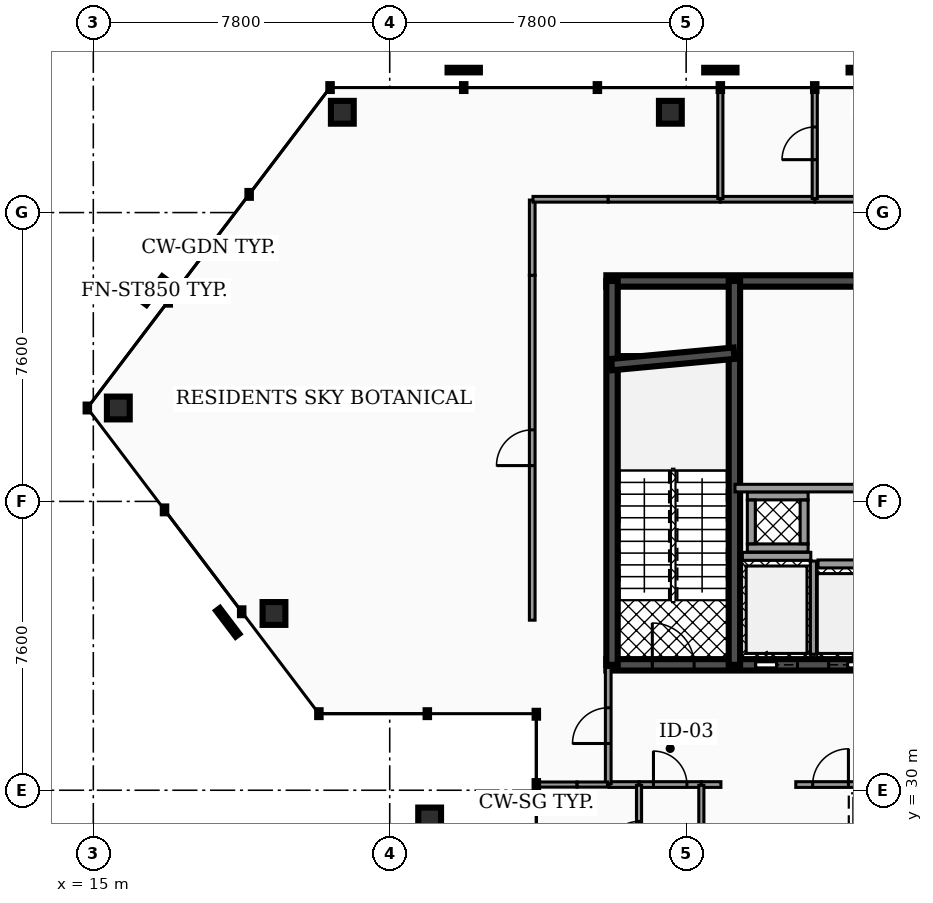
"""IFC4 building model, lengths in metres.
Left out: names, types, materials, properties, quantities, classifications, styles, units other than length and angle.
Written with IfcOpenShell. Run it as: python <this file> out.ifc"""

import sys

from ifc_helpers import new_model, si_unit, direction, frame, frame_2d, origin, origin_2d, place, context, subcontext, project, spatial, rectangle, hollow_rectangle, extrude, element, fill, save


model = new_model("IFC4")
c1 = context("Model", 3, precision=1e-05, world=origin(), true_north=direction((0.0, 1.0)))
c2 = subcontext(c1, "Body", "Model", "MODEL_VIEW")
j1 = project(units=[si_unit("LENGTHUNIT", "METRE"), si_unit("PLANEANGLEUNIT", "RADIAN")], contexts=[c1])
p1 = place(None, origin())
s1 = spatial("IfcSite", under=j1, at=p1, CompositionType="ELEMENT")
p2 = place(p1, origin())
s2 = spatial("IfcBuilding", under=s1, at=p2, CompositionType="ELEMENT")
p3 = place(p2, frame((0.0, 0.0, 204.34)))
s3 = spatial("IfcBuildingStorey", under=s2, at=p3, CompositionType="ELEMENT", Elevation=204.34)
p4 = place(p3, frame((28.5, 43.4, 0.0), z_axis=(0.0, 0.0, 1.0), x_axis=(1.0, 0.0, 0.0)))
e1 = element("IfcWall", 1, at=p4, inside=s3, PredefinedType="SHEAR", context=c2, shape_type="SweptSolid", body=[
    extrude(rectangle(XDim=19.86, YDim=0.3, at=frame_2d((9.93, 0.0))), origin(), (0.0, 0.0, 1.0), 4.2),
])
p5 = place(p3, frame((28.5, 33.3, 0.0), z_axis=(0.0, 0.0, 1.0), x_axis=(1.0, 0.0, 0.0)))
e2 = element("IfcWall", 2, at=p5, inside=s3, PredefinedType="SHEAR", context=c2, shape_type="SweptSolid", body=[
    extrude(rectangle(XDim=19.86, YDim=0.3, at=frame_2d((9.93, 0.0))), origin(), (0.0, 0.0, 1.0), 4.2),
])
p6 = place(p5, frame((3.93, 0.0, 0.0)))
e3 = element("IfcOpeningElement", 3, at=p6, cuts=e2, PredefinedType="OPENING", context=c2, shape_type="SweptSolid", body=[
    extrude(rectangle(XDim=1.1, YDim=2.15, at=frame_2d((0.55, 1.075))), frame((0.0, 0.16, 0.0), z_axis=(0.0, -1.0, 0.0), x_axis=(1.0, 0.0, 0.0)), (0.0, 0.0, 1.0), 0.32),
])
p7 = place(p5, frame((14.77, 0.0, 0.0)))
e4 = element("IfcOpeningElement", 4, at=p7, cuts=e2, PredefinedType="OPENING", context=c2, shape_type="SweptSolid", body=[
    extrude(rectangle(XDim=1.1, YDim=2.15, at=frame_2d((0.55, 1.075))), frame((0.0, 0.16, 0.0), z_axis=(0.0, -1.0, 0.0), x_axis=(1.0, 0.0, 0.0)), (0.0, 0.0, 1.0), 0.32),
])
p8 = place(p5, frame((11.25, 0.0, 0.0)))
e5 = element("IfcOpeningElement", 5, at=p8, cuts=e2, PredefinedType="OPENING", context=c2, shape_type="SweptSolid", body=[
    extrude(rectangle(XDim=1.0, YDim=2.1, at=frame_2d((0.5, 1.05))), frame((0.0, 0.16, 0.0), z_axis=(0.0, -1.0, 0.0), x_axis=(1.0, 0.0, 0.0)), (0.0, 0.0, 1.0), 0.32),
])
p9 = place(p5, frame((12.95, 0.0, 0.0)))
e6 = element("IfcOpeningElement", 6, at=p9, cuts=e2, PredefinedType="OPENING", context=c2, shape_type="SweptSolid", body=[
    extrude(rectangle(XDim=1.0, YDim=2.1, at=frame_2d((0.5, 1.05))), frame((0.0, 0.16, 0.0), z_axis=(0.0, -1.0, 0.0), x_axis=(1.0, 0.0, 0.0)), (0.0, 0.0, 1.0), 0.32),
])
p10 = place(p5, frame((5.85, 0.0, 0.0)))
e7 = element("IfcOpeningElement", 7, at=p10, cuts=e2, PredefinedType="OPENING", context=c2, shape_type="SweptSolid", body=[
    extrude(rectangle(XDim=1.0, YDim=2.1, at=frame_2d((0.5, 1.05))), frame((0.0, 0.16, 0.0), z_axis=(0.0, -1.0, 0.0), x_axis=(1.0, 0.0, 0.0)), (0.0, 0.0, 1.0), 0.32),
])
p11 = place(p5, frame((1.21, 0.0, 0.0)))
e8 = element("IfcOpeningElement", 8, at=p11, cuts=e2, PredefinedType="OPENING", context=c2, shape_type="SweptSolid", body=[
    extrude(rectangle(XDim=1.1, YDim=2.2, at=frame_2d((0.55, 1.1))), frame((0.0, 0.16, 0.0), z_axis=(0.0, -1.0, 0.0), x_axis=(1.0, 0.0, 0.0)), (0.0, 0.0, 1.0), 0.32),
])
p12 = place(p5, frame((9.34, 0.0, 0.0)))
e9 = element("IfcOpeningElement", 9, at=p12, cuts=e2, PredefinedType="OPENING", context=c2, shape_type="SweptSolid", body=[
    extrude(rectangle(XDim=1.12, YDim=2.05, at=frame_2d((0.56, 1.025))), frame((0.0, 0.16, 0.0), z_axis=(0.0, -1.0, 0.0), x_axis=(1.0, 0.0, 0.0)), (0.0, 0.0, 1.0), 0.32),
])
p13 = place(p5, frame((17.55, 0.0, 0.0)))
e10 = element("IfcOpeningElement", 10, at=p13, cuts=e2, PredefinedType="OPENING", context=c2, shape_type="SweptSolid", body=[
    extrude(rectangle(XDim=1.1, YDim=2.2, at=frame_2d((0.55, 1.1))), frame((0.0, 0.16, 0.0), z_axis=(0.0, -1.0, 0.0), x_axis=(1.0, 0.0, 0.0)), (0.0, 0.0, 1.0), 0.32),
])
for number, where, z_axis, x_axis in (
    (11, (28.65, 33.3, 0.0), (0.0, 0.0, 1.0), (0.0, 1.0, 0.0)),
    (12, (31.87, 33.3, 0.0), (0.0, 0.0, 1.0), (0.0, 1.0, 0.0)),
):
    element("IfcWall", number, at=place(p3, frame(where, z_axis=z_axis, x_axis=x_axis)), inside=s3, PredefinedType="SHEAR", context=c2, shape_type="SweptSolid", body=[
        extrude(rectangle(XDim=10.1, YDim=0.3, at=frame_2d((5.05, 0.0))), origin(), (0.0, 0.0, 1.0), 4.2),
    ])
p14 = place(p3, frame((28.64, 41.2, 0.0), z_axis=(0.0, 0.0, 1.0), x_axis=(0.995687118776, 0.092774789157, 0.0)))
e13 = element("IfcWall", 13, at=p14, inside=s3, PredefinedType="SHEAR", context=c2, shape_type="SweptSolid", body=[
    extrude(rectangle(XDim=3.234, YDim=0.3, at=frame_2d((1.617, 0.0))), origin(), (0.0, 0.0, 1.0), 4.2),
])
p15 = place(p3, frame((30.185, 47.839, 0.0), z_axis=(-0.021615343823, -0.018593844149, 0.99959344029), x_axis=(0.652132982659, -0.758104592341, 0.0)))
e14 = element("IfcColumn", 14, at=p15, inside=s3, PredefinedType="COLUMN", context=c2, shape_type="SweptSolid", body=[
    extrude(hollow_rectangle(XDim=0.6, YDim=0.6, WallThickness=0.03, at=origin_2d()), origin(), (0.0, 0.0, 1.0), 4.202),
])
p16 = place(p3, frame((21.553, 47.839, 0.0), z_axis=(-0.039780236336, -0.01858346807, 0.99903562875), x_axis=(0.423247470362, -0.906014116243, 0.0)))
e15 = element("IfcColumn", 15, at=p16, inside=s3, PredefinedType="COLUMN", context=c2, shape_type="SweptSolid", body=[
    extrude(hollow_rectangle(XDim=0.6, YDim=0.6, WallThickness=0.03, at=origin_2d()), origin(), (0.0, 0.0, 1.0), 4.204),
])
p17 = place(p3, frame((15.658, 40.058, 0.0), z_axis=(0.026319341166, 0.068638986653, 0.997294330572), x_axis=(-0.933710970217, 0.358027686215, 0.0)))
e16 = element("IfcColumn", 16, at=p17, inside=s3, PredefinedType="COLUMN", context=c2, shape_type="SweptSolid", body=[
    extrude(hollow_rectangle(XDim=0.6, YDim=0.6, WallThickness=0.03, at=origin_2d()), origin(), (0.0, 0.0, 1.0), 4.211),
])
p18 = place(p3, frame((19.754, 34.651, 0.0), z_axis=(0.033520923169, 0.059212564975, 0.997682424351), x_axis=(-0.870229277639, 0.492646936802, 0.0)))
e17 = element("IfcColumn", 17, at=p18, inside=s3, PredefinedType="COLUMN", context=c2, shape_type="SweptSolid", body=[
    extrude(hollow_rectangle(XDim=0.6, YDim=0.6, WallThickness=0.03, at=origin_2d()), origin(), (0.0, 0.0, 1.0), 4.21),
])
p19 = place(p3, frame((23.85, 29.244, 0.0), z_axis=(0.040664573665, 0.049714036564, 0.997935322061), x_axis=(-0.77403777564, 0.633139417414, 0.0)))
e18 = element("IfcColumn", 18, at=p19, inside=s3, PredefinedType="COLUMN", context=c2, shape_type="SweptSolid", body=[
    extrude(hollow_rectangle(XDim=0.6, YDim=0.6, WallThickness=0.03, at=origin_2d()), origin(), (0.0, 0.0, 1.0), 4.209),
])
p20 = place(p3, frame((32.08, 36.155, 0.0), z_axis=(0.0, 0.0, 1.0), x_axis=(1.0, 0.0, 0.0)))
e19 = element("IfcWall", 19, at=p20, inside=s3, PredefinedType="SOLIDWALL", context=c2, shape_type="SweptSolid", body=[
    extrude(rectangle(XDim=1.8, YDim=0.21, at=frame_2d((0.9, 0.0))), origin(), (0.0, 0.0, 1.0), 3.172),
])
p21 = place(p3, frame((33.95, 33.58, 0.0), z_axis=(0.0, 0.0, 1.0), x_axis=(0.0, 1.0, 0.0)))
e20 = element("IfcWall", 20, at=p21, inside=s3, PredefinedType="SOLIDWALL", context=c2, shape_type="SweptSolid", body=[
    extrude(rectangle(XDim=2.45, YDim=0.16, at=frame_2d((1.225, 0.0))), origin(), (0.0, 0.0, 1.0), 3.172),
])
p22 = place(p3, frame((34.07, 35.955, 0.0), z_axis=(0.0, 0.0, 1.0), x_axis=(1.0, 0.0, 0.0)))
e21 = element("IfcWall", 21, at=p22, inside=s3, PredefinedType="SOLIDWALL", context=c2, shape_type="SweptSolid", body=[
    extrude(rectangle(XDim=1.56, YDim=0.21, at=frame_2d((0.78, 0.0))), origin(), (0.0, 0.0, 1.0), 3.172),
])
for number, where, z_axis, x_axis in (
    (22, (32.21, 36.375, 0.0), (0.0, 0.0, 1.0), (1.0, 0.0, 0.0)),
    (23, (32.21, 37.745, 0.0), (0.0, 0.0, 1.0), (1.0, 0.0, 0.0)),
):
    element("IfcWall", number, at=place(p3, frame(where, z_axis=z_axis, x_axis=x_axis)), inside=s3, PredefinedType="SOLIDWALL", context=c2, shape_type="SweptSolid", body=[
        extrude(rectangle(XDim=1.6, YDim=0.21, at=frame_2d((0.8, 0.0))), origin(), (0.0, 0.0, 1.0), 4.2),
    ])
for number, where, z_axis, x_axis in (
    (24, (32.315, 36.485, 0.0), (0.0, 0.0, 1.0), (0.0, 1.0, 0.0)),
    (25, (33.705, 36.485, 0.0), (0.0, 0.0, 1.0), (0.0, 1.0, 0.0)),
):
    element("IfcWall", number, at=place(p3, frame(where, z_axis=z_axis, x_axis=x_axis)), inside=s3, PredefinedType="SOLIDWALL", context=c2, shape_type="SweptSolid", body=[
        extrude(rectangle(XDim=1.15, YDim=0.21, at=frame_2d((0.575, 0.0))), origin(), (0.0, 0.0, 1.0), 4.2),
    ])
p23 = place(p3, frame((31.885, 37.95, 0.0), z_axis=(0.0, 0.0, 1.0), x_axis=(1.0, 0.0, 0.0)))
e26 = element("IfcWall", 26, at=p23, inside=s3, PredefinedType="PARTITIONING", context=c2, shape_type="SweptSolid", body=[
    extrude(rectangle(XDim=3.895, YDim=0.2, at=frame_2d((1.948, 0.0))), origin(), (0.0, 0.0, 1.0), 3.157),
])
p24 = place(p3, frame((29.365, 30.15, 0.0), z_axis=(0.0, 0.0, 1.0), x_axis=(1.0, 0.0, 0.0)))
e27 = element("IfcWall", 27, at=p24, inside=s3, PredefinedType="PARTITIONING", context=c2, shape_type="SweptSolid", body=[
    extrude(rectangle(XDim=1.63, YDim=0.15, at=frame_2d((0.815, 0.0))), origin(), (0.0, 0.0, 1.0), 3.157),
])
p25 = place(p24, frame((0.375, 0.0, 0.0)))
e28 = element("IfcOpeningElement", 28, at=p25, cuts=e27, PredefinedType="OPENING", context=c2, shape_type="SweptSolid", body=[
    extrude(rectangle(XDim=0.88, YDim=2.05, at=frame_2d((0.44, 1.025))), frame((0.0, 0.085, 0.0), z_axis=(0.0, -1.0, 0.0), x_axis=(1.0, 0.0, 0.0)), (0.0, 0.0, 1.0), 0.17),
])
p26 = place(p3, frame((28.57, 30.15, 0.0), z_axis=(0.0, 0.0, 1.0), x_axis=(1.0, 0.0, 0.0)))
e29 = element("IfcWall", 29, at=p26, inside=s3, PredefinedType="PARTITIONING", context=c2, shape_type="SweptSolid", body=[
    extrude(rectangle(XDim=0.785, YDim=0.15, at=frame_2d((0.393, 0.0))), origin(), (0.0, 0.0, 1.0), 3.157),
])
p27 = place(p3, frame((33.485, 30.15, 0.0), z_axis=(0.0, 0.0, 1.0), x_axis=(1.0, 0.0, 0.0)))
e30 = element("IfcWall", 30, at=p27, inside=s3, PredefinedType="PARTITIONING", context=c2, shape_type="SweptSolid", body=[
    extrude(rectangle(XDim=9.83, YDim=0.15, at=frame_2d((4.915, 0.0))), origin(), (0.0, 0.0, 1.0), 3.157),
])
p28 = place(p27, frame((0.445, 0.0, 0.0)))
e31 = element("IfcOpeningElement", 31, at=p28, cuts=e30, PredefinedType="OPENING", context=c2, shape_type="SweptSolid", body=[
    extrude(rectangle(XDim=0.94, YDim=2.05, at=frame_2d((0.47, 1.025))), frame((0.0, 0.085, 0.0), z_axis=(0.0, -1.0, 0.0), x_axis=(1.0, 0.0, 0.0)), (0.0, 0.0, 1.0), 0.17),
])
p29 = place(p3, frame((31.005, 30.15, 0.0), z_axis=(0.0, 0.0, 1.0), x_axis=(1.0, 0.0, 0.0)))
e32 = element("IfcWall", 32, at=p29, inside=s3, PredefinedType="PARTITIONING", context=c2, shape_type="SweptSolid", body=[
    extrude(rectangle(XDim=0.51, YDim=0.15, at=frame_2d((0.255, 0.0))), origin(), (0.0, 0.0, 1.0), 3.157),
])
p30 = place(p3, frame((28.55, 30.17, 0.0), z_axis=(0.0, 0.0, 1.0), x_axis=(0.0, 1.0, 0.0)))
e33 = element("IfcWall", 33, at=p30, inside=s3, PredefinedType="PARTITIONING", context=c2, shape_type="SweptSolid", body=[
    extrude(rectangle(XDim=3.06, YDim=0.15, at=frame_2d((1.53, 0.0))), origin(), (0.0, 0.0, 1.0), 3.157),
])
p31 = place(p30, frame((1.06, 0.0, 0.0)))
e34 = element("IfcOpeningElement", 34, at=p31, cuts=e33, PredefinedType="OPENING", context=c2, shape_type="SweptSolid", body=[
    extrude(rectangle(XDim=0.94, YDim=2.05, at=frame_2d((0.47, 1.025))), frame((0.0, 0.085, 0.0), z_axis=(0.0, -1.0, 0.0), x_axis=(1.0, 0.0, 0.0)), (0.0, 0.0, 1.0), 0.17),
])
p32 = place(p3, frame((26.55, 34.475, 0.0), z_axis=(0.0, 0.0, 1.0), x_axis=(0.0, 1.0, 0.0)))
e35 = element("IfcWall", 35, at=p32, inside=s3, PredefinedType="PARTITIONING", context=c2, shape_type="SweptSolid", body=[
    extrude(rectangle(XDim=9.075, YDim=0.15, at=frame_2d((4.538, 0.0))), origin(), (0.0, 0.0, 1.0), 3.157),
])
p33 = place(p32, frame((4.067, 0.0, 0.0)))
e36 = element("IfcOpeningElement", 36, at=p33, cuts=e35, PredefinedType="OPENING", context=c2, shape_type="SweptSolid", body=[
    extrude(rectangle(XDim=0.94, YDim=2.05, at=frame_2d((0.47, 1.025))), frame((0.0, 0.085, 0.0), z_axis=(0.0, -1.0, 0.0), x_axis=(1.0, 0.0, 0.0)), (0.0, 0.0, 1.0), 0.17),
])
for number, where, z_axis, x_axis in (
    (37, (26.55, 43.55, 0.0), (0.0, 0.0, 1.0), (0.0, 1.0, 0.0)),
    (38, (26.57, 45.55, 0.0), (0.0, 0.0, 1.0), (1.0, 0.0, 0.0)),
):
    element("IfcWall", number, at=place(p3, frame(where, z_axis=z_axis, x_axis=x_axis)), inside=s3, PredefinedType="PARTITIONING", context=c2, shape_type="SweptSolid", body=[
        extrude(rectangle(XDim=1.98, YDim=0.15, at=frame_2d((0.99, 0.0))), origin(), (0.0, 0.0, 1.0), 3.157),
    ])
p34 = place(p3, frame((28.55, 45.55, 0.0), z_axis=(0.0, 0.0, 1.0), x_axis=(1.0, 0.0, 0.0)))
e39 = element("IfcWall", 39, at=p34, inside=s3, PredefinedType="PARTITIONING", context=c2, shape_type="SweptSolid", body=[
    extrude(rectangle(XDim=2.945, YDim=0.15, at=frame_2d((1.473, 0.0))), origin(), (0.0, 0.0, 1.0), 3.157),
])
p35 = place(p3, frame((33.989, 45.55, 0.0), z_axis=(0.0, 0.0, 1.0), x_axis=(1.0, 0.0, 0.0)))
e40 = element("IfcWall", 40, at=p35, inside=s3, PredefinedType="PARTITIONING", context=c2, shape_type="SweptSolid", body=[
    extrude(rectangle(XDim=3.385, YDim=0.15, at=frame_2d((1.692, 0.0))), origin(), (0.0, 0.0, 1.0), 3.157),
])
p36 = place(p35, frame((1.222, 0.0, 0.0)))
e41 = element("IfcOpeningElement", 41, at=p36, cuts=e40, PredefinedType="OPENING", context=c2, shape_type="SweptSolid", body=[
    extrude(rectangle(XDim=0.94, YDim=2.05, at=frame_2d((0.47, 1.025))), frame((0.0, 0.085, 0.0), z_axis=(0.0, -1.0, 0.0), x_axis=(1.0, 0.0, 0.0)), (0.0, 0.0, 1.0), 0.17),
])
p37 = place(p3, frame((31.505, 45.55, 0.0), z_axis=(0.0, 0.0, 1.0), x_axis=(1.0, 0.0, 0.0)))
e42 = element("IfcWall", 42, at=p37, inside=s3, PredefinedType="PARTITIONING", context=c2, shape_type="SweptSolid", body=[
    extrude(rectangle(XDim=2.474, YDim=0.15, at=frame_2d((1.237, 0.0))), origin(), (0.0, 0.0, 1.0), 3.157),
])
p38 = place(p3, frame((29.36, 27.37, 0.0), z_axis=(0.0, 0.0, 1.0), x_axis=(0.0, 1.0, 0.0)))
e43 = element("IfcWall", 43, at=p38, inside=s3, PredefinedType="PARTITIONING", context=c2, shape_type="SweptSolid", body=[
    extrude(rectangle(XDim=2.76, YDim=0.135, at=frame_2d((1.38, 0.0))), origin(), (0.0, 0.0, 1.0), 3.157),
])
p39 = place(p38, frame((0.95, 0.0, 0.0)))
e44 = element("IfcOpeningElement", 44, at=p39, cuts=e43, PredefinedType="OPENING", context=c2, shape_type="SweptSolid", body=[
    extrude(rectangle(XDim=0.86, YDim=2.05, at=frame_2d((0.43, 1.025))), frame((0.0, 0.077, 0.0), z_axis=(0.0, -1.0, 0.0), x_axis=(1.0, 0.0, 0.0)), (0.0, 0.0, 1.0), 0.155),
])
p40 = place(p3, frame((31.0, 27.37, 0.0), z_axis=(0.0, 0.0, 1.0), x_axis=(0.0, 1.0, 0.0)))
e45 = element("IfcWall", 45, at=p40, inside=s3, PredefinedType="PARTITIONING", context=c2, shape_type="SweptSolid", body=[
    extrude(rectangle(XDim=2.76, YDim=0.135, at=frame_2d((1.38, 0.0))), origin(), (0.0, 0.0, 1.0), 3.157),
])
p41 = place(p3, frame((26.673, 30.15, 0.0), z_axis=(0.0, 0.0, 1.0), x_axis=(1.0, 0.0, 0.0)))
e46 = element("IfcWall", 46, at=p41, inside=s3, PredefinedType="PARTITIONING", context=c2, shape_type="SweptSolid", body=[
    extrude(rectangle(XDim=1.057, YDim=0.135, at=frame_2d((0.529, 0.0))), origin(), (0.0, 0.0, 1.0), 3.157),
])
p42 = place(p3, frame((27.73, 30.15, 0.0), z_axis=(0.0, 0.0, 1.0), x_axis=(1.0, 0.0, 0.0)))
e47 = element("IfcWall", 47, at=p42, inside=s3, PredefinedType="PARTITIONING", context=c2, shape_type="SweptSolid", body=[
    extrude(rectangle(XDim=0.8, YDim=0.135, at=frame_2d((0.4, 0.0))), origin(), (0.0, 0.0, 1.0), 3.157),
])
p43 = place(p3, frame((31.5, 45.57, 0.0), z_axis=(0.0, 0.0, 1.0), x_axis=(0.0, 1.0, 0.0)))
e48 = element("IfcWall", 48, at=p43, inside=s3, PredefinedType="PARTITIONING", context=c2, shape_type="SweptSolid", body=[
    extrude(rectangle(XDim=2.904, YDim=0.135, at=frame_2d((1.452, 0.0))), origin(), (0.0, 0.0, 1.0), 3.157),
])
p44 = place(p3, frame((33.984, 45.57, 0.0), z_axis=(0.0, 0.0, 1.0), x_axis=(0.0, 1.0, 0.0)))
e49 = element("IfcWall", 49, at=p44, inside=s3, PredefinedType="PARTITIONING", context=c2, shape_type="SweptSolid", body=[
    extrude(rectangle(XDim=2.904, YDim=0.135, at=frame_2d((1.452, 0.0))), origin(), (0.0, 0.0, 1.0), 3.157),
])
p45 = place(p44, frame((1.022, 0.0, 0.0)))
e50 = element("IfcOpeningElement", 50, at=p45, cuts=e49, PredefinedType="OPENING", context=c2, shape_type="SweptSolid", body=[
    extrude(rectangle(XDim=0.86, YDim=2.05, at=frame_2d((0.43, 1.025))), frame((0.0, 0.077, 0.0), z_axis=(0.0, -1.0, 0.0), x_axis=(1.0, 0.0, 0.0)), (0.0, 0.0, 1.0), 0.155),
])
p46 = place(p6, origin())
e51 = element("IfcDoor", 51, at=p46, inside=s3, OperationType="SLIDING_TO_LEFT", PredefinedType="DOOR", context=c2, shape_type="SweptSolid", body=[
    extrude(rectangle(XDim=1.1, YDim=2.15, at=frame_2d((0.55, 1.075))), frame((0.0, 0.025, 0.0), z_axis=(0.0, -1.0, 0.0), x_axis=(1.0, 0.0, 0.0)), (0.0, 0.0, 1.0), 0.05),
])
fill(e3, e51)
p47 = place(p10, origin())
e52 = element("IfcDoor", 52, at=p47, inside=s3, OperationType="SLIDING_TO_RIGHT", PredefinedType="DOOR", context=c2, shape_type="SweptSolid", body=[
    extrude(rectangle(XDim=1.0, YDim=2.1, at=frame_2d((0.5, 1.05))), frame((0.0, 0.025, 0.0), z_axis=(0.0, -1.0, 0.0), x_axis=(1.0, 0.0, 0.0)), (0.0, 0.0, 1.0), 0.05),
])
fill(e7, e52)
p48 = place(p11, origin())
e53 = element("IfcDoor", 53, at=p48, inside=s3, OperationType="SINGLE_SWING_LEFT", PredefinedType="DOOR", context=c2, shape_type="SweptSolid", body=[
    extrude(rectangle(XDim=1.1, YDim=2.2, at=frame_2d((0.55, 1.1))), frame((0.0, 0.025, 0.0), z_axis=(0.0, -1.0, 0.0), x_axis=(1.0, 0.0, 0.0)), (0.0, 0.0, 1.0), 0.05),
])
fill(e8, e53)
p49 = place(p25, origin())
e54 = element("IfcDoor", 54, at=p49, inside=s3, OperationType="SINGLE_SWING_LEFT", PredefinedType="DOOR", context=c2, shape_type="SweptSolid", body=[
    extrude(rectangle(XDim=0.88, YDim=2.05, at=frame_2d((0.44, 1.025))), frame((0.0, 0.025, 0.0), z_axis=(0.0, -1.0, 0.0), x_axis=(1.0, 0.0, 0.0)), (0.0, 0.0, 1.0), 0.05),
])
fill(e28, e54)
p50 = place(p28, origin())
e55 = element("IfcDoor", 55, at=p50, inside=s3, OperationType="SINGLE_SWING_RIGHT", PredefinedType="DOOR", context=c2, shape_type="SweptSolid", body=[
    extrude(rectangle(XDim=0.94, YDim=2.05, at=frame_2d((0.47, 1.025))), frame((0.0, 0.025, 0.0), z_axis=(0.0, -1.0, 0.0), x_axis=(1.0, 0.0, 0.0)), (0.0, 0.0, 1.0), 0.05),
])
fill(e31, e55)
p51 = place(p31, origin())
e56 = element("IfcDoor", 56, at=p51, inside=s3, OperationType="SINGLE_SWING_LEFT", PredefinedType="DOOR", context=c2, shape_type="SweptSolid", body=[
    extrude(rectangle(XDim=0.94, YDim=2.05, at=frame_2d((0.47, 1.025))), frame((0.0, 0.025, 0.0), z_axis=(0.0, -1.0, 0.0), x_axis=(1.0, 0.0, 0.0)), (0.0, 0.0, 1.0), 0.05),
])
fill(e34, e56)
p52 = place(p33, origin())
e57 = element("IfcDoor", 57, at=p52, inside=s3, OperationType="SINGLE_SWING_LEFT", PredefinedType="DOOR", context=c2, shape_type="SweptSolid", body=[
    extrude(rectangle(XDim=0.94, YDim=2.05, at=frame_2d((0.47, 1.025))), frame((0.0, 0.025, 0.0), z_axis=(0.0, -1.0, 0.0), x_axis=(1.0, 0.0, 0.0)), (0.0, 0.0, 1.0), 0.05),
])
fill(e36, e57)
p53 = place(p39, origin())
e58 = element("IfcDoor", 58, at=p53, inside=s3, OperationType="SINGLE_SWING_LEFT", PredefinedType="DOOR", context=c2, shape_type="SweptSolid", body=[
    extrude(rectangle(XDim=0.86, YDim=2.05, at=frame_2d((0.43, 1.025))), frame((0.0, 0.025, 0.0), z_axis=(0.0, -1.0, 0.0), x_axis=(1.0, 0.0, 0.0)), (0.0, 0.0, 1.0), 0.05),
])
fill(e44, e58)
p54 = place(p45, origin())
e59 = element("IfcDoor", 59, at=p54, inside=s3, OperationType="SINGLE_SWING_LEFT", PredefinedType="DOOR", context=c2, shape_type="SweptSolid", body=[
    extrude(rectangle(XDim=0.86, YDim=2.05, at=frame_2d((0.43, 1.025))), frame((0.0, 0.025, 0.0), z_axis=(0.0, -1.0, 0.0), x_axis=(1.0, 0.0, 0.0)), (0.0, 0.0, 1.0), 0.05),
])
fill(e50, e59)
save(model, sys.argv[1])
